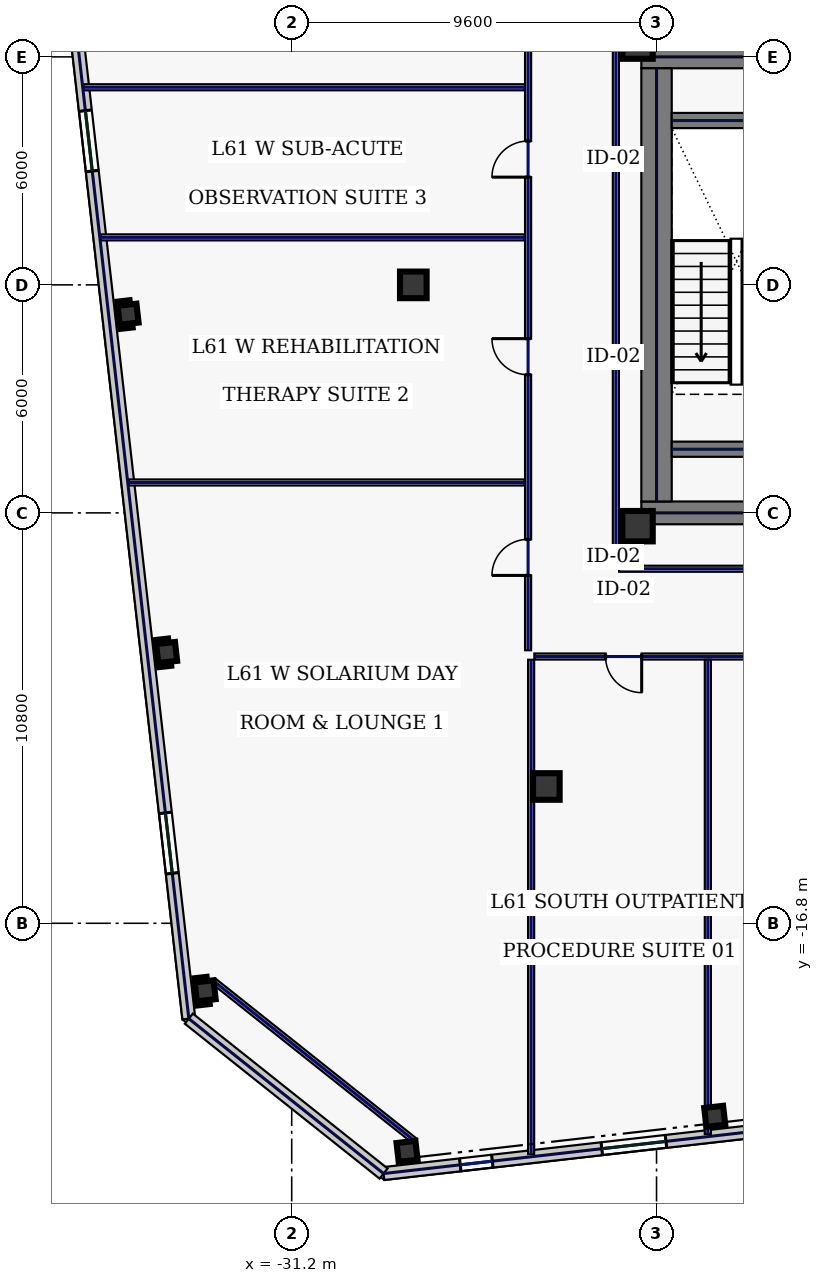
"""IFC4 building model, lengths in metres.
Left out: names, types, materials, properties, quantities, classifications, styles, units other than length and angle.
Written with IfcOpenShell. Run it as: python <this file> out.ifc"""

import sys

from ifc_helpers import new_model, si_unit, direction, frame, frame_2d, origin, origin_2d, place, context, subcontext, project, spatial, rectangle, hollow_rectangle, extrude, element, fill, save


model = new_model("IFC4")
c1 = context("Model", 3, precision=1e-05, world=origin(), true_north=direction((0.0, 1.0)))
c2 = subcontext(c1, "Body", "Model", "MODEL_VIEW")
j1 = project(units=[si_unit("LENGTHUNIT", "METRE"), si_unit("PLANEANGLEUNIT", "RADIAN")], contexts=[c1])
p1 = place(None, origin())
s1 = spatial("IfcSite", under=j1, at=p1, CompositionType="ELEMENT")
p2 = place(p1, origin())
s2 = spatial("IfcBuilding", under=s1, at=p2, CompositionType="ELEMENT")
p3 = place(p2, frame((0.0, 0.0, 263.0)))
s3 = spatial("IfcBuildingStorey", under=s2, at=p3, CompositionType="ELEMENT", Elevation=263.0)
for number, where, z_axis, x_axis in (
    (1, (-22.0, 6.0, 0.0), (0.0, 0.0, 1.0), (1.0, 0.0, 0.0)),
    (2, (-22.0, -6.0, 0.0), (0.0, 0.0, 1.0), (1.0, 0.0, 0.0)),
):
    element("IfcWall", number, at=place(p3, frame(where, z_axis=z_axis, x_axis=x_axis)), inside=s3, PredefinedType="SHEAR", context=c2, shape_type="SweptSolid", body=[
        extrude(rectangle(XDim=11.5, YDim=0.6, at=frame_2d((5.75, 0.0))), origin(), (0.0, 0.0, 1.0), 3.74),
    ])
p4 = place(p3, frame((-21.6, -5.7, 0.0), z_axis=(0.0, 0.0, 1.0), x_axis=(0.0, 1.0, 0.0)))
e3 = element("IfcWall", 3, at=p4, inside=s3, PredefinedType="SHEAR", context=c2, shape_type="SweptSolid", body=[
    extrude(rectangle(XDim=11.4, YDim=0.8, at=frame_2d((5.7, 0.0))), origin(), (0.0, 0.0, 1.0), 3.74),
])
for number, where, z_axis, x_axis in (
    (4, (-21.2, -4.325, 0.0), (0.0, 0.0, 1.0), (1.0, 0.0, 0.0)),
    (5, (-21.2, 4.325, 0.0), (0.0, 0.0, 1.0), (1.0, 0.0, 0.0)),
):
    element("IfcWall", number, at=place(p3, frame(where, z_axis=z_axis, x_axis=x_axis)), inside=s3, PredefinedType="SHEAR", context=c2, shape_type="SweptSolid", body=[
        extrude(rectangle(XDim=3.4, YDim=0.4, at=frame_2d((1.7, 0.0))), origin(), (0.0, 0.0, 1.0), 3.74),
    ])
for number, where, z_axis, x_axis in (
    (6, (-22.1, -6.35, 0.0), (0.0, 0.0, 1.0), (1.0, 0.0, 0.0)),
    (7, (-22.1, 6.35, 0.0), (0.0, 0.0, 1.0), (1.0, 0.0, 0.0)),
):
    element("IfcColumn", number, at=place(p3, frame(where, z_axis=z_axis, x_axis=x_axis)), inside=s3, PredefinedType="COLUMN", context=c2, shape_type="SweptSolid", body=[
        extrude(hollow_rectangle(XDim=0.8, YDim=0.8, WallThickness=0.036, at=origin_2d()), origin(), (0.0, 0.0, 1.0), 3.74),
    ])
for number, where, z_axis, x_axis in (
    (8, (-24.5, -13.2, 0.0), (0.0, 0.0, 1.0), (1.0, 0.0, 0.0)),
    (9, (-28.0, 0.0, 0.0), (0.0, 0.0, 1.0), (1.0, 0.0, 0.0)),
):
    element("IfcColumn", number, at=place(p3, frame(where, z_axis=z_axis, x_axis=x_axis)), inside=s3, PredefinedType="COLUMN", context=c2, shape_type="SweptSolid", body=[
        extrude(hollow_rectangle(XDim=0.7, YDim=0.7, WallThickness=0.032, at=origin_2d()), origin(), (0.0, 0.0, 1.0), 3.74),
    ])
for number, where, z_axis, x_axis in (
    (10, (-28.165, -22.802, 0.0), (0.0, 0.0, 1.0), (0.994, 0.113, 0.0)),
    (11, (-20.069, -21.88, 0.0), (0.0, 0.0, 1.0), (0.994, 0.113, 0.0)),
    (12, (-35.506, -0.772, 0.0), (0.0, 0.0, 1.0), (0.994, 0.113, 0.0)),
    (13, (-34.491, -9.674, 0.0), (0.0, 0.0, 1.0), (0.994, 0.113, 0.0)),
    (14, (-33.477, -18.577, 0.0), (0.0, 0.0, 1.0), (0.994, 0.113, 0.0)),
):
    element("IfcColumn", number, at=place(p3, frame(where, z_axis=z_axis, x_axis=x_axis)), inside=s3, PredefinedType="COLUMN", context=c2, shape_type="SweptSolid", body=[
        extrude(hollow_rectangle(XDim=0.5, YDim=0.5, WallThickness=0.025, at=origin_2d()), origin(), (0.0, 0.0, 1.0), 3.74),
    ])
p5 = place(p3, frame((-28.783, -23.386, 0.0), z_axis=(0.0, 0.0, 1.0), x_axis=(0.993572271362, 0.113199565282, 0.0)))
e15 = element("IfcWall", 15, at=p5, inside=s3, PredefinedType="STANDARD", context=c2, shape_type="SweptSolid", body=[
    extrude(rectangle(XDim=18.651, YDim=0.34, at=frame_2d((9.326, 0.0))), origin(), (0.0, 0.0, 1.0), 3.74),
])
p6 = place(p5, frame((2.03, 0.0, 0.88)))
e16 = element("IfcOpeningElement", 16, at=p6, cuts=e15, PredefinedType="OPENING", context=c2, shape_type="SweptSolid", body=[
    extrude(rectangle(XDim=0.85, YDim=1.85, at=frame_2d((0.425, 0.925))), frame((0.0, 0.18, 0.0), z_axis=(0.0, -1.0, 0.0), x_axis=(1.0, 0.0, 0.0)), (0.0, 0.0, 1.0), 0.36),
])
p7 = place(p5, frame((5.779, 0.0, 0.88)))
e17 = element("IfcOpeningElement", 17, at=p7, cuts=e15, PredefinedType="OPENING", context=c2, shape_type="SweptSolid", body=[
    extrude(rectangle(XDim=1.7, YDim=1.95, at=frame_2d((0.85, 0.975))), frame((0.0, 0.18, 0.0), z_axis=(0.0, -1.0, 0.0), x_axis=(1.0, 0.0, 0.0)), (0.0, 0.0, 1.0), 0.36),
])
p8 = place(p5, frame((10.179, 0.0, 0.88)))
e18 = element("IfcOpeningElement", 18, at=p8, cuts=e15, PredefinedType="OPENING", context=c2, shape_type="SweptSolid", body=[
    extrude(rectangle(XDim=1.7, YDim=1.95, at=frame_2d((0.85, 0.975))), frame((0.0, 0.18, 0.0), z_axis=(0.0, -1.0, 0.0), x_axis=(1.0, 0.0, 0.0)), (0.0, 0.0, 1.0), 0.36),
])
p9 = place(p5, frame((13.927, 0.0, 0.88)))
e19 = element("IfcOpeningElement", 19, at=p9, cuts=e15, PredefinedType="OPENING", context=c2, shape_type="SweptSolid", body=[
    extrude(rectangle(XDim=1.7, YDim=1.95, at=frame_2d((0.85, 0.975))), frame((0.0, 0.18, 0.0), z_axis=(0.0, -1.0, 0.0), x_axis=(1.0, 0.0, 0.0)), (0.0, 0.0, 1.0), 0.36),
])
p10 = place(p3, frame((-38.118, 17.651, 0.0), z_axis=(0.0, 0.0, 1.0), x_axis=(0.11320360501, -0.9935718111, 0.0)))
e20 = element("IfcWall", 20, at=p10, inside=s3, PredefinedType="STANDARD", context=c2, shape_type="SweptSolid", body=[
    extrude(rectangle(XDim=37.2, YDim=0.34, at=frame_2d((18.6, 0.0))), origin(), (0.0, 0.0, 1.0), 3.74),
])
p11 = place(p10, frame((3.85, 0.0, 0.58)))
e21 = element("IfcOpeningElement", 21, at=p11, cuts=e20, PredefinedType="OPENING", context=c2, shape_type="SweptSolid", body=[
    extrude(rectangle(XDim=1.6, YDim=2.3, at=frame_2d((0.8, 1.15))), frame((0.0, 0.18, 0.0), z_axis=(0.0, -1.0, 0.0), x_axis=(1.0, 0.0, 0.0)), (0.0, 0.0, 1.0), 0.36),
])
p12 = place(p10, frame((13.15, 0.0, 0.58)))
e22 = element("IfcOpeningElement", 22, at=p12, cuts=e20, PredefinedType="OPENING", context=c2, shape_type="SweptSolid", body=[
    extrude(rectangle(XDim=1.6, YDim=2.3, at=frame_2d((0.8, 1.15))), frame((0.0, 0.18, 0.0), z_axis=(0.0, -1.0, 0.0), x_axis=(1.0, 0.0, 0.0)), (0.0, 0.0, 1.0), 0.36),
])
p13 = place(p10, frame((31.75, 0.0, 0.58)))
e23 = element("IfcOpeningElement", 23, at=p13, cuts=e20, PredefinedType="OPENING", context=c2, shape_type="SweptSolid", body=[
    extrude(rectangle(XDim=1.6, YDim=2.3, at=frame_2d((0.8, 1.15))), frame((0.0, 0.18, 0.0), z_axis=(0.0, -1.0, 0.0), x_axis=(1.0, 0.0, 0.0)), (0.0, 0.0, 1.0), 0.36),
])
p14 = place(p3, frame((-33.907, -19.31, 0.0), z_axis=(0.0, 0.0, 1.0), x_axis=(0.782611787794, -0.622510071892, 0.0)))
e24 = element("IfcWall", 24, at=p14, inside=s3, PredefinedType="STANDARD", context=c2, shape_type="SweptSolid", body=[
    extrude(rectangle(XDim=6.548, YDim=0.34, at=frame_2d((3.274, 0.0))), origin(), (0.0, 0.0, 1.0), 3.74),
])
p15 = place(p3, frame((-33.265, -18.311, 0.0), z_axis=(0.0, 0.0, 1.0), x_axis=(0.782602647064, -0.622521563328, 0.0)))
e25 = element("IfcWall", 25, at=p15, inside=s3, PredefinedType="PARTITIONING", context=c2, shape_type="SweptSolid", body=[
    extrude(rectangle(XDim=6.788, YDim=0.16, at=frame_2d((3.394, 0.0))), origin(), (0.0, 0.0, 1.0), 3.74),
])
p16 = place(p3, frame((-24.98, -9.615, 0.0), z_axis=(0.0, 0.0, 1.0), x_axis=(0.0, 1.0, 0.0)))
e26 = element("IfcWall", 26, at=p16, inside=s3, PredefinedType="PARTITIONING", context=c2, shape_type="SweptSolid", body=[
    extrude(rectangle(XDim=19.28, YDim=0.16, at=frame_2d((9.64, 0.0))), origin(), (0.0, 0.0, 1.0), 3.74),
])
p17 = place(p16, frame((1.969, 0.0, 0.0)))
e27 = element("IfcOpeningElement", 27, at=p17, cuts=e26, PredefinedType="OPENING", context=c2, shape_type="SweptSolid", body=[
    extrude(rectangle(XDim=0.95, YDim=2.2, at=frame_2d((0.475, 1.1))), frame((0.0, 0.09, 0.0), z_axis=(0.0, -1.0, 0.0), x_axis=(1.0, 0.0, 0.0)), (0.0, 0.0, 1.0), 0.18),
])
p18 = place(p16, frame((7.25, 0.0, 0.0)))
e28 = element("IfcOpeningElement", 28, at=p18, cuts=e26, PredefinedType="OPENING", context=c2, shape_type="SweptSolid", body=[
    extrude(rectangle(XDim=0.95, YDim=2.2, at=frame_2d((0.475, 1.1))), frame((0.0, 0.09, 0.0), z_axis=(0.0, -1.0, 0.0), x_axis=(1.0, 0.0, 0.0)), (0.0, 0.0, 1.0), 0.18),
])
p19 = place(p16, frame((12.45, 0.0, 0.0)))
e29 = element("IfcOpeningElement", 29, at=p19, cuts=e26, PredefinedType="OPENING", context=c2, shape_type="SweptSolid", body=[
    extrude(rectangle(XDim=0.95, YDim=2.2, at=frame_2d((0.475, 1.1))), frame((0.0, 0.09, 0.0), z_axis=(0.0, -1.0, 0.0), x_axis=(1.0, 0.0, 0.0)), (0.0, 0.0, 1.0), 0.18),
])
p20 = place(p16, frame((16.506, 0.0, 0.0)))
e30 = element("IfcOpeningElement", 30, at=p20, cuts=e26, PredefinedType="OPENING", context=c2, shape_type="SweptSolid", body=[
    extrude(rectangle(XDim=0.95, YDim=2.2, at=frame_2d((0.475, 1.1))), frame((0.0, 0.09, 0.0), z_axis=(0.0, -1.0, 0.0), x_axis=(1.0, 0.0, 0.0)), (0.0, 0.0, 1.0), 0.18),
])
p21 = place(p3, frame((-15.065, -9.78, 0.0), z_axis=(0.0, 0.0, 1.0), x_axis=(-1.0, 0.0, 0.0)))
e31 = element("IfcWall", 31, at=p21, inside=s3, PredefinedType="PARTITIONING", context=c2, shape_type="SweptSolid", body=[
    extrude(rectangle(XDim=9.75, YDim=0.16, at=frame_2d((4.875, 0.0))), origin(), (0.0, 0.0, 1.0), 3.74),
])
p22 = place(p21, frame((6.926, 0.0, 0.0)))
e32 = element("IfcOpeningElement", 32, at=p22, cuts=e31, PredefinedType="OPENING", context=c2, shape_type="SweptSolid", body=[
    extrude(rectangle(XDim=0.95, YDim=2.2, at=frame_2d((0.475, 1.1))), frame((0.0, 0.09, 0.0), z_axis=(0.0, -1.0, 0.0), x_axis=(1.0, 0.0, 0.0)), (0.0, 0.0, 1.0), 0.18),
])
p23 = place(p21, frame((2.354, 0.0, 0.0)))
e33 = element("IfcOpeningElement", 33, at=p23, cuts=e31, PredefinedType="OPENING", context=c2, shape_type="SweptSolid", body=[
    extrude(rectangle(XDim=0.95, YDim=2.2, at=frame_2d((0.475, 1.1))), frame((0.0, 0.09, 0.0), z_axis=(0.0, -1.0, 0.0), x_axis=(1.0, 0.0, 0.0)), (0.0, 0.0, 1.0), 0.18),
])
p24 = place(p3, frame((-22.67, 7.435, 0.0), z_axis=(0.0, 0.0, 1.0), x_axis=(0.0, -1.0, 0.0)))
e34 = element("IfcWall", 34, at=p24, inside=s3, PredefinedType="PARTITIONING", context=c2, shape_type="SweptSolid", body=[
    extrude(rectangle(XDim=14.82, YDim=0.16, at=frame_2d((7.41, 0.0))), origin(), (0.0, 0.0, 1.0), 3.74),
])
p25 = place(p3, frame((-22.585, -7.47, 0.0), z_axis=(0.0, 0.0, 1.0), x_axis=(1.0, 0.0, 0.0)))
e35 = element("IfcWall", 35, at=p25, inside=s3, PredefinedType="PARTITIONING", context=c2, shape_type="SweptSolid", body=[
    extrude(rectangle(XDim=11.87, YDim=0.16, at=frame_2d((5.935, 0.0))), origin(), (0.0, 0.0, 1.0), 3.74),
])
p26 = place(p3, frame((-24.9, -22.873, 0.0), z_axis=(0.0, 0.0, 1.0), x_axis=(0.0, 1.0, 0.0)))
e36 = element("IfcWall", 36, at=p26, inside=s3, PredefinedType="PARTITIONING", context=c2, shape_type="SweptSolid", body=[
    extrude(rectangle(XDim=13.008, YDim=0.16, at=frame_2d((6.504, 0.0))), origin(), (0.0, 0.0, 1.0), 3.74),
])
p27 = place(p3, frame((-20.25, -22.344, 0.0), z_axis=(0.0, 0.0, 1.0), x_axis=(0.0, 1.0, 0.0)))
e37 = element("IfcWall", 37, at=p27, inside=s3, PredefinedType="PARTITIONING", context=c2, shape_type="SweptSolid", body=[
    extrude(rectangle(XDim=12.479, YDim=0.16, at=frame_2d((6.239, 0.0))), origin(), (0.0, 0.0, 1.0), 3.74),
])
p28 = place(p3, frame((-35.494, -5.2, 0.0), z_axis=(0.0, 0.0, 1.0), x_axis=(1.0, 0.0, 0.0)))
e38 = element("IfcWall", 38, at=p28, inside=s3, PredefinedType="PARTITIONING", context=c2, shape_type="SweptSolid", body=[
    extrude(rectangle(XDim=10.429, YDim=0.16, at=frame_2d((5.215, 0.0))), origin(), (0.0, 0.0, 1.0), 3.74),
])
p29 = place(p3, frame((-36.229, 1.25, 0.0), z_axis=(0.0, 0.0, 1.0), x_axis=(1.0, 0.0, 0.0)))
e39 = element("IfcWall", 39, at=p29, inside=s3, PredefinedType="PARTITIONING", context=c2, shape_type="SweptSolid", body=[
    extrude(rectangle(XDim=11.165, YDim=0.16, at=frame_2d((5.582, 0.0))), origin(), (0.0, 0.0, 1.0), 3.74),
])
p30 = place(p3, frame((-36.679, 5.2, 0.0), z_axis=(0.0, 0.0, 1.0), x_axis=(1.0, 0.0, 0.0)))
e40 = element("IfcWall", 40, at=p30, inside=s3, PredefinedType="PARTITIONING", context=c2, shape_type="SweptSolid", body=[
    extrude(rectangle(XDim=11.615, YDim=0.16, at=frame_2d((5.807, 0.0))), origin(), (0.0, 0.0, 1.0), 3.74),
])
p31 = place(p6, origin())
e41 = element("IfcWindow", 41, at=p31, inside=s3, PartitioningType="SINGLE_PANEL", PredefinedType="WINDOW", context=c2, shape_type="SweptSolid", body=[
    extrude(rectangle(XDim=0.85, YDim=1.85, at=frame_2d((0.425, 0.925))), frame((0.0, 0.03, 0.0), z_axis=(0.0, -1.0, 0.0), x_axis=(1.0, 0.0, 0.0)), (0.0, 0.0, 1.0), 0.06),
])
fill(e16, e41)
p32 = place(p7, origin())
e42 = element("IfcWindow", 42, at=p32, inside=s3, PartitioningType="SINGLE_PANEL", PredefinedType="WINDOW", context=c2, shape_type="SweptSolid", body=[
    extrude(rectangle(XDim=1.7, YDim=1.95, at=frame_2d((0.85, 0.975))), frame((0.0, 0.03, 0.0), z_axis=(0.0, -1.0, 0.0), x_axis=(1.0, 0.0, 0.0)), (0.0, 0.0, 1.0), 0.06),
])
fill(e17, e42)
p33 = place(p12, origin())
e43 = element("IfcWindow", 43, at=p33, inside=s3, PartitioningType="SINGLE_PANEL", PredefinedType="WINDOW", context=c2, shape_type="SweptSolid", body=[
    extrude(rectangle(XDim=1.6, YDim=2.3, at=frame_2d((0.8, 1.15))), frame((0.0, 0.03, 0.0), z_axis=(0.0, -1.0, 0.0), x_axis=(1.0, 0.0, 0.0)), (0.0, 0.0, 1.0), 0.06),
])
fill(e22, e43)
p34 = place(p13, origin())
e44 = element("IfcWindow", 44, at=p34, inside=s3, PartitioningType="SINGLE_PANEL", PredefinedType="WINDOW", context=c2, shape_type="SweptSolid", body=[
    extrude(rectangle(XDim=1.6, YDim=2.3, at=frame_2d((0.8, 1.15))), frame((0.0, 0.03, 0.0), z_axis=(0.0, -1.0, 0.0), x_axis=(1.0, 0.0, 0.0)), (0.0, 0.0, 1.0), 0.06),
])
fill(e23, e44)
p35 = place(p22, origin())
e45 = element("IfcDoor", 45, at=p35, inside=s3, OperationType="SINGLE_SWING_LEFT", PredefinedType="DOOR", context=c2, shape_type="SweptSolid", body=[
    extrude(rectangle(XDim=0.95, YDim=2.2, at=frame_2d((0.475, 1.1))), frame((0.0, 0.025, 0.0), z_axis=(0.0, -1.0, 0.0), x_axis=(1.0, 0.0, 0.0)), (0.0, 0.0, 1.0), 0.05),
])
fill(e32, e45)
p36 = place(p17, origin())
e46 = element("IfcDoor", 46, at=p36, inside=s3, OperationType="SINGLE_SWING_LEFT", PredefinedType="DOOR", context=c2, shape_type="SweptSolid", body=[
    extrude(rectangle(XDim=0.95, YDim=2.2, at=frame_2d((0.475, 1.1))), frame((0.0, 0.025, 0.0), z_axis=(0.0, -1.0, 0.0), x_axis=(1.0, 0.0, 0.0)), (0.0, 0.0, 1.0), 0.05),
])
fill(e27, e46)
p37 = place(p18, origin())
e47 = element("IfcDoor", 47, at=p37, inside=s3, OperationType="SINGLE_SWING_RIGHT", PredefinedType="DOOR", context=c2, shape_type="SweptSolid", body=[
    extrude(rectangle(XDim=0.95, YDim=2.2, at=frame_2d((0.475, 1.1))), frame((0.0, 0.025, 0.0), z_axis=(0.0, -1.0, 0.0), x_axis=(1.0, 0.0, 0.0)), (0.0, 0.0, 1.0), 0.05),
])
fill(e28, e47)
p38 = place(p19, origin())
e48 = element("IfcDoor", 48, at=p38, inside=s3, OperationType="SINGLE_SWING_LEFT", PredefinedType="DOOR", context=c2, shape_type="SweptSolid", body=[
    extrude(rectangle(XDim=0.95, YDim=2.2, at=frame_2d((0.475, 1.1))), frame((0.0, 0.025, 0.0), z_axis=(0.0, -1.0, 0.0), x_axis=(1.0, 0.0, 0.0)), (0.0, 0.0, 1.0), 0.05),
])
fill(e29, e48)
save(model, sys.argv[1])
